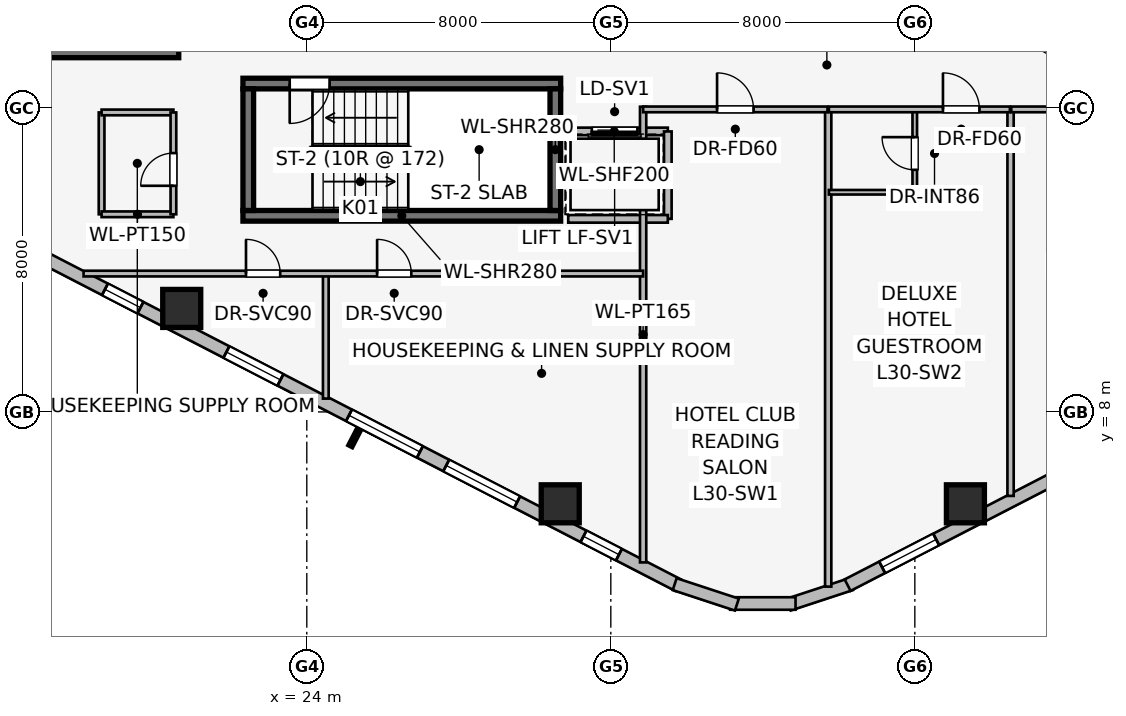
"""IFC4 building model, lengths in metres.
Left out: names, types, materials, properties, quantities, classifications, styles, units other than length and angle.
Written with IfcOpenShell. Run it as: python <this file> out.ifc"""

import sys

from ifc_helpers import new_model, si_unit, direction, frame, frame_2d, origin, origin_2d, place, context, subcontext, project, spatial, rectangle, extrude, element, fill, save


model = new_model("IFC4")
c1 = context("Model", 3, precision=1e-05, world=origin(), true_north=direction((0.0, 1.0)))
c2 = subcontext(c1, "Body", "Model", "MODEL_VIEW")
j1 = project(units=[si_unit("LENGTHUNIT", "METRE"), si_unit("PLANEANGLEUNIT", "RADIAN")], contexts=[c1])
p1 = place(None, origin())
s1 = spatial("IfcSite", under=j1, at=p1, CompositionType="ELEMENT")
p2 = place(p1, origin())
s2 = spatial("IfcBuilding", under=s1, at=p2, CompositionType="ELEMENT")
p3 = place(p2, frame((0.0, 0.0, 115.35)))
s3 = spatial("IfcBuildingStorey", under=s2, at=p3, CompositionType="ELEMENT", Elevation=115.35)
p4 = place(p3, frame((16.87, 17.46, 0.0), z_axis=(0.0, 0.0, 1.0), x_axis=(1.0, 0.0, 0.0)))
e1 = element("IfcWall", 1, at=p4, inside=s3, PredefinedType="SHEAR", context=c2, shape_type="SweptSolid", body=[
    extrude(rectangle(XDim=3.76, YDim=0.28, at=frame_2d((1.88, 0.0))), origin(), (0.0, 0.0, 1.0), 3.45),
])
p5 = place(p3, frame((22.32, 13.16, 0.0), z_axis=(0.0, 0.0, 1.0), x_axis=(1.0, 0.0, 0.0)))
e2 = element("IfcWall", 2, at=p5, inside=s3, PredefinedType="SHEAR", context=c2, shape_type="SweptSolid", body=[
    extrude(rectangle(XDim=8.36, YDim=0.28, at=frame_2d((4.18, 0.0))), origin(), (0.0, 0.0, 1.0), 3.45),
])
p6 = place(p3, frame((30.68, 16.64, 0.0), z_axis=(0.0, 0.0, 1.0), x_axis=(-1.0, 0.0, 0.0)))
e3 = element("IfcWall", 3, at=p6, inside=s3, PredefinedType="SHEAR", context=c2, shape_type="SweptSolid", body=[
    extrude(rectangle(XDim=8.36, YDim=0.28, at=frame_2d((4.18, 0.0))), origin(), (0.0, 0.0, 1.0), 3.45),
])
p7 = place(p6, frame((6.08, 0.0, 0.0)))
e4 = element("IfcOpeningElement", 4, at=p7, cuts=e3, PredefinedType="OPENING", context=c2, shape_type="SweptSolid", body=[
    extrude(rectangle(XDim=1.05, YDim=2.0, at=frame_2d((0.525, 1.0))), frame((0.0, 0.15, 0.0), z_axis=(0.0, -1.0, 0.0), x_axis=(1.0, 0.0, 0.0)), (0.0, 0.0, 1.0), 0.3),
])
for number, where, z_axis, x_axis in (
    (5, (22.46, 16.5, 0.0), (0.0, 0.0, 1.0), (0.0, -1.0, 0.0)),
    (6, (30.54, 13.3, 0.0), (0.0, 0.0, 1.0), (0.0, 1.0, 0.0)),
):
    element("IfcWall", number, at=place(p3, frame(where, z_axis=z_axis, x_axis=x_axis)), inside=s3, PredefinedType="SHEAR", context=c2, shape_type="SweptSolid", body=[
        extrude(rectangle(XDim=3.2, YDim=0.28, at=frame_2d((1.6, 0.0))), origin(), (0.0, 0.0, 1.0), 3.45),
    ])
for number, where, z_axis, x_axis in (
    (7, (20.709, 10.723, 0.0), (0.0, 0.0, 1.0), (1.0, 0.0, 0.0)),
    (8, (30.669, 5.582, 0.0), (0.0, 0.0, 1.0), (1.0, 0.0, 0.0)),
    (9, (41.331, 5.582, 0.0), (0.0, 0.0, 1.0), (1.0, 0.0, 0.0)),
):
    element("IfcColumn", number, at=place(p3, frame(where, z_axis=z_axis, x_axis=x_axis)), inside=s3, PredefinedType="COLUMN", context=c2, shape_type="SweptSolid", body=[
        extrude(rectangle(XDim=1.0, YDim=1.0, at=origin_2d()), origin(), (0.0, 0.0, 1.0), 3.45),
    ])
p8 = place(p3, frame((17.243, 11.95, 0.0), z_axis=(0.0, 0.0, 1.0), x_axis=(-0.790621329885, 0.612305408053, 0.0)))
e10 = element("IfcWall", 10, at=p8, inside=s3, PredefinedType="STANDARD", context=c2, shape_type="SweptSolid", body=[
    extrude(rectangle(XDim=1.676, YDim=0.33, at=frame_2d((0.838, 0.0))), origin(), (0.0, 0.0, 1.0), 3.16),
])
p9 = place(p3, frame((33.769, 3.442, 0.0), z_axis=(0.0, 0.0, 1.0), x_axis=(-0.888613612362, 0.458656568606, 0.0)))
e11 = element("IfcWall", 11, at=p9, inside=s3, PredefinedType="STANDARD", context=c2, shape_type="SweptSolid", body=[
    extrude(rectangle(XDim=18.681, YDim=0.34, at=frame_2d((9.34, 0.0))), origin(), (0.0, 0.0, 1.0), 3.16),
])
p10 = place(p9, frame((1.75, 0.0, 0.75)))
e12 = element("IfcOpeningElement", 12, at=p10, cuts=e11, PredefinedType="OPENING", context=c2, shape_type="SweptSolid", body=[
    extrude(rectangle(XDim=1.05, YDim=1.4, at=frame_2d((0.525, 0.7))), frame((0.0, 0.18, 0.0), z_axis=(0.0, -1.0, 0.0), x_axis=(1.0, 0.0, 0.0)), (0.0, 0.0, 1.0), 0.36),
])
p11 = place(p9, frame((4.765, 0.0, 0.75)))
e13 = element("IfcOpeningElement", 13, at=p11, cuts=e11, PredefinedType="OPENING", context=c2, shape_type="SweptSolid", body=[
    extrude(rectangle(XDim=2.1, YDim=1.5, at=frame_2d((1.05, 0.75))), frame((0.0, 0.18, 0.0), z_axis=(0.0, -1.0, 0.0), x_axis=(1.0, 0.0, 0.0)), (0.0, 0.0, 1.0), 0.36),
])
p12 = place(p9, frame((7.644, 0.0, 0.75)))
e14 = element("IfcOpeningElement", 14, at=p12, cuts=e11, PredefinedType="OPENING", context=c2, shape_type="SweptSolid", body=[
    extrude(rectangle(XDim=2.1, YDim=1.5, at=frame_2d((1.05, 0.75))), frame((0.0, 0.18, 0.0), z_axis=(0.0, -1.0, 0.0), x_axis=(1.0, 0.0, 0.0)), (0.0, 0.0, 1.0), 0.36),
])
p13 = place(p9, frame((11.774, 0.0, 0.75)))
e15 = element("IfcOpeningElement", 15, at=p13, cuts=e11, PredefinedType="OPENING", context=c2, shape_type="SweptSolid", body=[
    extrude(rectangle(XDim=1.6, YDim=1.55, at=frame_2d((0.8, 0.775))), frame((0.0, 0.18, 0.0), z_axis=(0.0, -1.0, 0.0), x_axis=(1.0, 0.0, 0.0)), (0.0, 0.0, 1.0), 0.36),
])
p14 = place(p9, frame((15.92, 0.0, 0.75)))
e16 = element("IfcOpeningElement", 16, at=p14, cuts=e11, PredefinedType="OPENING", context=c2, shape_type="SweptSolid", body=[
    extrude(rectangle(XDim=1.05, YDim=1.4, at=frame_2d((0.525, 0.7))), frame((0.0, 0.18, 0.0), z_axis=(0.0, -1.0, 0.0), x_axis=(1.0, 0.0, 0.0)), (0.0, 0.0, 1.0), 0.36),
])
for number, where, z_axis, x_axis in (
    (17, (38.319, 3.468, 0.0), (0.0, 0.0, 1.0), (-0.95, -0.312, 0.0)),
    (18, (36.861, 2.959, 0.0), (0.0, 0.0, 1.0), (-1.0, 0.0, 0.0)),
    (19, (35.317, 2.93, 0.0), (0.0, 0.0, 1.0), (-0.95, 0.312, 0.0)),
):
    element("IfcWall", number, at=place(p3, frame(where, z_axis=z_axis, x_axis=x_axis)), inside=s3, PredefinedType="STANDARD", context=c2, shape_type="SweptSolid", body=[
        extrude(rectangle(XDim=1.722, YDim=0.33, at=frame_2d((0.861, 0.0))), origin(), (0.0, 0.0, 1.0), 3.16),
    ])
p15 = place(p3, frame((54.831, 12.01, 0.0), z_axis=(0.0, 0.0, 1.0), x_axis=(-0.888613612362, -0.458656568606, 0.0)))
e20 = element("IfcWall", 20, at=p15, inside=s3, PredefinedType="STANDARD", context=c2, shape_type="SweptSolid", body=[
    extrude(rectangle(XDim=18.681, YDim=0.34, at=frame_2d((9.34, 0.0))), origin(), (0.0, 0.0, 1.0), 3.16),
])
p16 = place(p15, frame((1.023, 0.0, 0.75)))
e21 = element("IfcOpeningElement", 21, at=p16, cuts=e20, PredefinedType="OPENING", context=c2, shape_type="SweptSolid", body=[
    extrude(rectangle(XDim=1.6, YDim=1.55, at=frame_2d((0.8, 0.775))), frame((0.0, 0.18, 0.0), z_axis=(0.0, -1.0, 0.0), x_axis=(1.0, 0.0, 0.0)), (0.0, 0.0, 1.0), 0.36),
])
p17 = place(p15, frame((6.848, 0.0, 0.75)))
e22 = element("IfcOpeningElement", 22, at=p17, cuts=e20, PredefinedType="OPENING", context=c2, shape_type="SweptSolid", body=[
    extrude(rectangle(XDim=2.1, YDim=1.5, at=frame_2d((1.05, 0.75))), frame((0.0, 0.18, 0.0), z_axis=(0.0, -1.0, 0.0), x_axis=(1.0, 0.0, 0.0)), (0.0, 0.0, 1.0), 0.36),
])
p18 = place(p15, frame((10.536, 0.0, 0.75)))
e23 = element("IfcOpeningElement", 23, at=p18, cuts=e20, PredefinedType="OPENING", context=c2, shape_type="SweptSolid", body=[
    extrude(rectangle(XDim=2.1, YDim=1.5, at=frame_2d((1.05, 0.75))), frame((0.0, 0.18, 0.0), z_axis=(0.0, -1.0, 0.0), x_axis=(1.0, 0.0, 0.0)), (0.0, 0.0, 1.0), 0.36),
])
p19 = place(p15, frame((16.058, 0.0, 0.75)))
e24 = element("IfcOpeningElement", 24, at=p19, cuts=e20, PredefinedType="OPENING", context=c2, shape_type="SweptSolid", body=[
    extrude(rectangle(XDim=1.6, YDim=1.55, at=frame_2d((0.8, 0.775))), frame((0.0, 0.18, 0.0), z_axis=(0.0, -1.0, 0.0), x_axis=(1.0, 0.0, 0.0)), (0.0, 0.0, 1.0), 0.36),
])
p20 = place(p3, frame((33.5, 15.38, 0.0), z_axis=(0.0, 0.0, 1.0), x_axis=(-1.0, 0.0, 0.0)))
e25 = element("IfcWall", 25, at=p20, inside=s3, PredefinedType="PARTITIONING", context=c2, shape_type="SweptSolid", body=[
    extrude(rectangle(XDim=2.82, YDim=0.2, at=frame_2d((1.41, 0.0))), origin(), (0.0, 0.0, 1.0), 3.16),
])
p21 = place(p20, frame((0.8, 0.0, 0.0)))
e26 = element("IfcOpeningElement", 26, at=p21, cuts=e25, PredefinedType="OPENING", context=c2, shape_type="SweptSolid", body=[
    extrude(rectangle(XDim=1.2, YDim=2.2, at=frame_2d((0.6, 1.1))), frame((0.0, 0.11, 0.0), z_axis=(0.0, -1.0, 0.0), x_axis=(1.0, 0.0, 0.0)), (0.0, 0.0, 1.0), 0.22),
])
p22 = place(p3, frame((33.5, 13.08, 0.0), z_axis=(0.0, 0.0, 1.0), x_axis=(0.0, 1.0, 0.0)))
e27 = element("IfcWall", 27, at=p22, inside=s3, PredefinedType="PARTITIONING", context=c2, shape_type="SweptSolid", body=[
    extrude(rectangle(XDim=2.3, YDim=0.2, at=frame_2d((1.15, 0.0))), origin(), (0.0, 0.0, 1.0), 3.16),
])
p23 = place(p3, frame((30.879, 13.08, 0.0), z_axis=(0.0, 0.0, 1.0), x_axis=(1.0, 0.0, 0.0)))
e28 = element("IfcWall", 28, at=p23, inside=s3, PredefinedType="PARTITIONING", context=c2, shape_type="SweptSolid", body=[
    extrude(rectangle(XDim=2.621, YDim=0.2, at=frame_2d((1.311, 0.0))), origin(), (0.0, 0.0, 1.0), 3.16),
])
p24 = place(p3, frame((18.6, 15.88, 0.0), z_axis=(0.0, 0.0, 1.0), x_axis=(0.0, -1.0, 0.0)))
e29 = element("IfcWall", 29, at=p24, inside=s3, PredefinedType="PARTITIONING", context=c2, shape_type="SweptSolid", body=[
    extrude(rectangle(XDim=2.68, YDim=0.15, at=frame_2d((1.34, 0.0))), origin(), (0.0, 0.0, 1.0), 3.16),
])
for number, where, z_axis, x_axis in (
    (30, (18.6, 13.2, 0.0), (0.0, 0.0, 1.0), (1.0, 0.0, 0.0)),
    (31, (18.6, 15.88, 0.0), (0.0, 0.0, 1.0), (1.0, 0.0, 0.0)),
):
    element("IfcWall", number, at=place(p3, frame(where, z_axis=z_axis, x_axis=x_axis)), inside=s3, PredefinedType="PARTITIONING", context=c2, shape_type="SweptSolid", body=[
        extrude(rectangle(XDim=1.89, YDim=0.15, at=frame_2d((0.945, 0.0))), origin(), (0.0, 0.0, 1.0), 3.16),
    ])
p25 = place(p3, frame((20.49, 13.2, 0.0), z_axis=(0.0, 0.0, 1.0), x_axis=(0.0, 1.0, 0.0)))
e32 = element("IfcWall", 32, at=p25, inside=s3, PredefinedType="PARTITIONING", context=c2, shape_type="SweptSolid", body=[
    extrude(rectangle(XDim=2.68, YDim=0.15, at=frame_2d((1.34, 0.0))), origin(), (0.0, 0.0, 1.0), 3.16),
])
p26 = place(p25, frame((0.75, 0.0, 0.0)))
e33 = element("IfcOpeningElement", 33, at=p26, cuts=e32, PredefinedType="OPENING", context=c2, shape_type="SweptSolid", body=[
    extrude(rectangle(XDim=0.86, YDim=2.0, at=frame_2d((0.43, 1.0))), frame((0.0, 0.085, 0.0), z_axis=(0.0, -1.0, 0.0), x_axis=(1.0, 0.0, 0.0)), (0.0, 0.0, 1.0), 0.17),
])
p27 = place(p3, frame((32.85, 4.04, 0.0), z_axis=(0.0, 0.0, 1.0), x_axis=(0.0, 1.0, 0.0)))
e34 = element("IfcWall", 34, at=p27, inside=s3, PredefinedType="PARTITIONING", context=c2, shape_type="SweptSolid", body=[
    extrude(rectangle(XDim=11.99, YDim=0.165, at=frame_2d((5.995, 0.0))), origin(), (0.0, 0.0, 1.0), 3.16),
])
p28 = place(p3, frame((24.5, 8.35, 0.0), z_axis=(0.0, 0.0, 1.0), x_axis=(0.0, 1.0, 0.0)))
e35 = element("IfcWall", 35, at=p28, inside=s3, PredefinedType="PARTITIONING", context=c2, shape_type="SweptSolid", body=[
    extrude(rectangle(XDim=3.29, YDim=0.15, at=frame_2d((1.645, 0.0))), origin(), (0.0, 0.0, 1.0), 3.16),
])
p29 = place(p3, frame((18.126, 11.64, 0.0), z_axis=(0.0, 0.0, 1.0), x_axis=(1.0, 0.0, 0.0)))
e36 = element("IfcWall", 36, at=p29, inside=s3, PredefinedType="PARTITIONING", context=c2, shape_type="SweptSolid", body=[
    extrude(rectangle(XDim=14.724, YDim=0.15, at=frame_2d((7.362, 0.0))), origin(), (0.0, 0.0, 1.0), 3.16),
])
p30 = place(p29, frame((4.274, 0.0, 0.0)))
e37 = element("IfcOpeningElement", 37, at=p30, cuts=e36, PredefinedType="OPENING", context=c2, shape_type="SweptSolid", body=[
    extrude(rectangle(XDim=0.9, YDim=2.0, at=frame_2d((0.45, 1.0))), frame((0.0, 0.085, 0.0), z_axis=(0.0, -1.0, 0.0), x_axis=(1.0, 0.0, 0.0)), (0.0, 0.0, 1.0), 0.17),
])
p31 = place(p29, frame((7.724, 0.0, 0.0)))
e38 = element("IfcOpeningElement", 38, at=p31, cuts=e36, PredefinedType="OPENING", context=c2, shape_type="SweptSolid", body=[
    extrude(rectangle(XDim=0.9, YDim=2.0, at=frame_2d((0.45, 1.0))), frame((0.0, 0.085, 0.0), z_axis=(0.0, -1.0, 0.0), x_axis=(1.0, 0.0, 0.0)), (0.0, 0.0, 1.0), 0.17),
])
p32 = place(p3, frame((37.72, 3.403, 0.0), z_axis=(0.0, 0.0, 1.0), x_axis=(0.0, 1.0, 0.0)))
e39 = element("IfcWall", 39, at=p32, inside=s3, PredefinedType="PARTITIONING", context=c2, shape_type="SweptSolid", body=[
    extrude(rectangle(XDim=12.527, YDim=0.165, at=frame_2d((6.263, 0.0))), origin(), (0.0, 0.0, 1.0), 3.16),
])
p33 = place(p3, frame((42.519, 5.79, 0.0), z_axis=(0.0, 0.0, 1.0), x_axis=(0.0, 1.0, 0.0)))
e40 = element("IfcWall", 40, at=p33, inside=s3, PredefinedType="PARTITIONING", context=c2, shape_type="SweptSolid", body=[
    extrude(rectangle(XDim=10.14, YDim=0.165, at=frame_2d((5.07, 0.0))), origin(), (0.0, 0.0, 1.0), 3.16),
])
p34 = place(p3, frame((32.85, 15.96, 0.0), z_axis=(0.0, 0.0, 1.0), x_axis=(1.0, 0.0, 0.0)))
e41 = element("IfcWall", 41, at=p34, inside=s3, PredefinedType="PARTITIONING", context=c2, shape_type="SweptSolid", body=[
    extrude(rectangle(XDim=4.852, YDim=0.15, at=frame_2d((2.426, 0.0))), origin(), (0.0, 0.0, 1.0), 3.16),
])
p35 = place(p34, frame((1.946, 0.0, 0.0)))
e42 = element("IfcOpeningElement", 42, at=p35, cuts=e41, PredefinedType="OPENING", context=c2, shape_type="SweptSolid", body=[
    extrude(rectangle(XDim=0.96, YDim=2.0, at=frame_2d((0.48, 1.0))), frame((0.0, 0.085, 0.0), z_axis=(0.0, -1.0, 0.0), x_axis=(1.0, 0.0, 0.0)), (0.0, 0.0, 1.0), 0.17),
])
p36 = place(p3, frame((39.998, 13.72, 0.0), z_axis=(0.0, 0.0, 1.0), x_axis=(0.0, 1.0, 0.0)))
e43 = element("IfcWall", 43, at=p36, inside=s3, PredefinedType="PARTITIONING", context=c2, shape_type="SweptSolid", body=[
    extrude(rectangle(XDim=2.24, YDim=0.12, at=frame_2d((1.12, 0.0))), origin(), (0.0, 0.0, 1.0), 2.39),
])
p37 = place(p36, frame((0.65, 0.0, 0.0)))
e44 = element("IfcOpeningElement", 44, at=p37, cuts=e43, PredefinedType="OPENING", context=c2, shape_type="SweptSolid", body=[
    extrude(rectangle(XDim=0.86, YDim=2.0, at=frame_2d((0.43, 1.0))), frame((0.0, 0.07, 0.0), z_axis=(0.0, -1.0, 0.0), x_axis=(1.0, 0.0, 0.0)), (0.0, 0.0, 1.0), 0.14),
])
p38 = place(p3, frame((37.738, 13.78, 0.0), z_axis=(0.0, 0.0, 1.0), x_axis=(1.0, 0.0, 0.0)))
e45 = element("IfcWall", 45, at=p38, inside=s3, PredefinedType="PARTITIONING", context=c2, shape_type="SweptSolid", body=[
    extrude(rectangle(XDim=2.32, YDim=0.12, at=frame_2d((1.16, 0.0))), origin(), (0.0, 0.0, 1.0), 3.16),
])
p39 = place(p3, frame((37.738, 15.96, 0.0), z_axis=(0.0, 0.0, 1.0), x_axis=(1.0, 0.0, 0.0)))
e46 = element("IfcWall", 46, at=p39, inside=s3, PredefinedType="PARTITIONING", context=c2, shape_type="SweptSolid", body=[
    extrude(rectangle(XDim=4.763, YDim=0.15, at=frame_2d((2.381, 0.0))), origin(), (0.0, 0.0, 1.0), 3.16),
])
p40 = place(p39, frame((3.002, 0.0, 0.0)))
e47 = element("IfcOpeningElement", 47, at=p40, cuts=e46, PredefinedType="OPENING", context=c2, shape_type="SweptSolid", body=[
    extrude(rectangle(XDim=0.96, YDim=2.0, at=frame_2d((0.48, 1.0))), frame((0.0, 0.085, 0.0), z_axis=(0.0, -1.0, 0.0), x_axis=(1.0, 0.0, 0.0)), (0.0, 0.0, 1.0), 0.17),
])
p41 = place(p3, frame((42.537, 15.96, 0.0), z_axis=(0.0, 0.0, 1.0), x_axis=(1.0, 0.0, 0.0)))
e48 = element("IfcWall", 48, at=p41, inside=s3, PredefinedType="PARTITIONING", context=c2, shape_type="SweptSolid", body=[
    extrude(rectangle(XDim=7.164, YDim=0.15, at=frame_2d((3.582, 0.0))), origin(), (0.0, 0.0, 1.0), 3.16),
])
p42 = place(p41, frame((3.102, 0.0, 0.0)))
e49 = element("IfcOpeningElement", 49, at=p42, cuts=e48, PredefinedType="OPENING", context=c2, shape_type="SweptSolid", body=[
    extrude(rectangle(XDim=0.96, YDim=2.0, at=frame_2d((0.48, 1.0))), frame((0.0, 0.085, 0.0), z_axis=(0.0, -1.0, 0.0), x_axis=(1.0, 0.0, 0.0)), (0.0, 0.0, 1.0), 0.17),
])
p43 = place(p10, origin())
e50 = element("IfcWindow", 50, at=p43, inside=s3, PartitioningType="SINGLE_PANEL", PredefinedType="WINDOW", context=c2, shape_type="SweptSolid", body=[
    extrude(rectangle(XDim=1.05, YDim=1.4, at=frame_2d((0.525, 0.7))), frame((0.0, 0.03, 0.0), z_axis=(0.0, -1.0, 0.0), x_axis=(1.0, 0.0, 0.0)), (0.0, 0.0, 1.0), 0.06),
])
fill(e12, e50)
p44 = place(p11, origin())
e51 = element("IfcWindow", 51, at=p44, inside=s3, PartitioningType="SINGLE_PANEL", PredefinedType="WINDOW", context=c2, shape_type="SweptSolid", body=[
    extrude(rectangle(XDim=2.1, YDim=1.5, at=frame_2d((1.05, 0.75))), frame((0.0, 0.03, 0.0), z_axis=(0.0, -1.0, 0.0), x_axis=(1.0, 0.0, 0.0)), (0.0, 0.0, 1.0), 0.06),
])
fill(e13, e51)
p45 = place(p12, origin())
e52 = element("IfcWindow", 52, at=p45, inside=s3, PartitioningType="SINGLE_PANEL", PredefinedType="WINDOW", context=c2, shape_type="SweptSolid", body=[
    extrude(rectangle(XDim=2.1, YDim=1.5, at=frame_2d((1.05, 0.75))), frame((0.0, 0.03, 0.0), z_axis=(0.0, -1.0, 0.0), x_axis=(1.0, 0.0, 0.0)), (0.0, 0.0, 1.0), 0.06),
])
fill(e14, e52)
p46 = place(p13, origin())
e53 = element("IfcWindow", 53, at=p46, inside=s3, PartitioningType="SINGLE_PANEL", PredefinedType="WINDOW", context=c2, shape_type="SweptSolid", body=[
    extrude(rectangle(XDim=1.6, YDim=1.55, at=frame_2d((0.8, 0.775))), frame((0.0, 0.03, 0.0), z_axis=(0.0, -1.0, 0.0), x_axis=(1.0, 0.0, 0.0)), (0.0, 0.0, 1.0), 0.06),
])
fill(e15, e53)
p47 = place(p14, origin())
e54 = element("IfcWindow", 54, at=p47, inside=s3, PartitioningType="SINGLE_PANEL", PredefinedType="WINDOW", context=c2, shape_type="SweptSolid", body=[
    extrude(rectangle(XDim=1.05, YDim=1.4, at=frame_2d((0.525, 0.7))), frame((0.0, 0.03, 0.0), z_axis=(0.0, -1.0, 0.0), x_axis=(1.0, 0.0, 0.0)), (0.0, 0.0, 1.0), 0.06),
])
fill(e16, e54)
p48 = place(p19, origin())
e55 = element("IfcWindow", 55, at=p48, inside=s3, PartitioningType="SINGLE_PANEL", PredefinedType="WINDOW", context=c2, shape_type="SweptSolid", body=[
    extrude(rectangle(XDim=1.6, YDim=1.55, at=frame_2d((0.8, 0.775))), frame((0.0, 0.03, 0.0), z_axis=(0.0, -1.0, 0.0), x_axis=(1.0, 0.0, 0.0)), (0.0, 0.0, 1.0), 0.06),
])
fill(e24, e55)
p49 = place(p7, origin())
e56 = element("IfcDoor", 56, at=p49, inside=s3, OperationType="SINGLE_SWING_RIGHT", PredefinedType="DOOR", context=c2, shape_type="SweptSolid", body=[
    extrude(rectangle(XDim=1.05, YDim=2.0, at=frame_2d((0.525, 1.0))), frame((0.0, 0.025, 0.0), z_axis=(0.0, -1.0, 0.0), x_axis=(1.0, 0.0, 0.0)), (0.0, 0.0, 1.0), 0.05),
])
fill(e4, e56)
p50 = place(p21, origin())
e57 = element("IfcDoor", 57, at=p50, inside=s3, OperationType="SLIDING_TO_RIGHT", PredefinedType="DOOR", context=c2, shape_type="SweptSolid", body=[
    extrude(rectangle(XDim=1.2, YDim=2.2, at=frame_2d((0.6, 1.1))), frame((0.0, 0.025, 0.0), z_axis=(0.0, -1.0, 0.0), x_axis=(1.0, 0.0, 0.0)), (0.0, 0.0, 1.0), 0.05),
])
fill(e26, e57)
p51 = place(p26, origin())
e58 = element("IfcDoor", 58, at=p51, inside=s3, OperationType="SINGLE_SWING_LEFT", PredefinedType="DOOR", context=c2, shape_type="SweptSolid", body=[
    extrude(rectangle(XDim=0.86, YDim=2.0, at=frame_2d((0.43, 1.0))), frame((0.0, 0.025, 0.0), z_axis=(0.0, -1.0, 0.0), x_axis=(1.0, 0.0, 0.0)), (0.0, 0.0, 1.0), 0.05),
])
fill(e33, e58)
p52 = place(p30, origin())
e59 = element("IfcDoor", 59, at=p52, inside=s3, OperationType="SINGLE_SWING_LEFT", PredefinedType="DOOR", context=c2, shape_type="SweptSolid", body=[
    extrude(rectangle(XDim=0.9, YDim=2.0, at=frame_2d((0.45, 1.0))), frame((0.0, 0.025, 0.0), z_axis=(0.0, -1.0, 0.0), x_axis=(1.0, 0.0, 0.0)), (0.0, 0.0, 1.0), 0.05),
])
fill(e37, e59)
p53 = place(p31, origin())
e60 = element("IfcDoor", 60, at=p53, inside=s3, OperationType="SINGLE_SWING_LEFT", PredefinedType="DOOR", context=c2, shape_type="SweptSolid", body=[
    extrude(rectangle(XDim=0.9, YDim=2.0, at=frame_2d((0.45, 1.0))), frame((0.0, 0.025, 0.0), z_axis=(0.0, -1.0, 0.0), x_axis=(1.0, 0.0, 0.0)), (0.0, 0.0, 1.0), 0.05),
])
fill(e38, e60)
p54 = place(p35, origin())
e61 = element("IfcDoor", 61, at=p54, inside=s3, OperationType="SINGLE_SWING_LEFT", PredefinedType="DOOR", context=c2, shape_type="SweptSolid", body=[
    extrude(rectangle(XDim=0.96, YDim=2.0, at=frame_2d((0.48, 1.0))), frame((0.0, 0.025, 0.0), z_axis=(0.0, -1.0, 0.0), x_axis=(1.0, 0.0, 0.0)), (0.0, 0.0, 1.0), 0.05),
])
fill(e42, e61)
p55 = place(p37, origin())
e62 = element("IfcDoor", 62, at=p55, inside=s3, OperationType="SINGLE_SWING_RIGHT", PredefinedType="DOOR", context=c2, shape_type="SweptSolid", body=[
    extrude(rectangle(XDim=0.86, YDim=2.0, at=frame_2d((0.43, 1.0))), frame((0.0, 0.025, 0.0), z_axis=(0.0, -1.0, 0.0), x_axis=(1.0, 0.0, 0.0)), (0.0, 0.0, 1.0), 0.05),
])
fill(e44, e62)
p56 = place(p40, origin())
e63 = element("IfcDoor", 63, at=p56, inside=s3, OperationType="SINGLE_SWING_LEFT", PredefinedType="DOOR", context=c2, shape_type="SweptSolid", body=[
    extrude(rectangle(XDim=0.96, YDim=2.0, at=frame_2d((0.48, 1.0))), frame((0.0, 0.025, 0.0), z_axis=(0.0, -1.0, 0.0), x_axis=(1.0, 0.0, 0.0)), (0.0, 0.0, 1.0), 0.05),
])
fill(e47, e63)
save(model, sys.argv[1])
